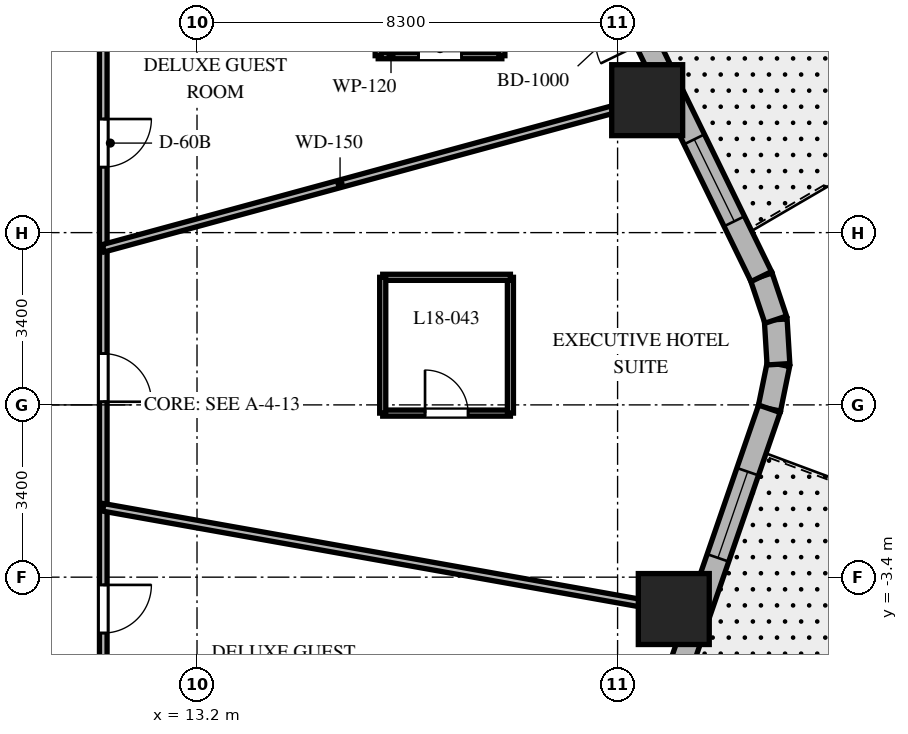
"""IFC4 building model, lengths in metres.
Left out: names, types, materials, properties, quantities, classifications, styles, units other than length and angle.
Written with IfcOpenShell. Run it as: python <this file> out.ifc"""

import sys

from ifc_helpers import new_model, si_unit, direction, frame, frame_2d, origin, origin_2d, place, context, subcontext, project, spatial, rectangle, extrude, element, fill, save


model = new_model("IFC4")
c1 = context("Model", 3, precision=1e-05, world=origin(), true_north=direction((0.0, 1.0)))
c2 = subcontext(c1, "Body", "Model", "MODEL_VIEW")
j1 = project(units=[si_unit("LENGTHUNIT", "METRE"), si_unit("PLANEANGLEUNIT", "RADIAN")], contexts=[c1])
p1 = place(None, origin())
s1 = spatial("IfcSite", under=j1, at=p1, CompositionType="ELEMENT")
p2 = place(p1, origin())
s2 = spatial("IfcBuilding", under=s1, at=p2, CompositionType="ELEMENT")
p3 = place(p2, frame((0.0, 0.0, 78.6)))
s3 = spatial("IfcBuildingStorey", under=s2, at=p3, CompositionType="ELEMENT", Elevation=78.6)
for number, where, z_axis, x_axis in (
    (1, (22.609, -4.029, 0.0), (0.0, 0.0, 1.0), (1.0, 0.0, 0.0)),
    (2, (22.084, 6.014, 0.0), (0.0, 0.0, 1.0), (1.0, 0.0, 0.0)),
):
    element("IfcColumn", number, at=place(p3, frame(where, z_axis=z_axis, x_axis=x_axis)), inside=s3, PredefinedType="COLUMN", context=c2, shape_type="SweptSolid", body=[
        extrude(rectangle(XDim=1.4, YDim=1.4, at=origin_2d()), origin(), (0.0, 0.0, 1.0), 3.7),
    ])
p4 = place(p3, frame((24.496, -0.077, 0.0), z_axis=(0.0, 0.0, 1.0), x_axis=(0.199570594521, 0.979883451132, 0.0)))
e3 = element("IfcWall", 3, at=p4, inside=s3, PredefinedType="SOLIDWALL", context=c2, shape_type="SweptSolid", body=[
    extrude(rectangle(XDim=0.897, YDim=0.45, at=frame_2d((0.448, 0.0))), origin(), (0.0, 0.0, 1.0), 3.4),
])
p5 = place(p3, frame((24.675, 0.802, 0.0), z_axis=(0.0, 0.0, 1.0), x_axis=(-0.061188874166, 0.998126205286, 0.0)))
e4 = element("IfcWall", 4, at=p5, inside=s3, PredefinedType="SOLIDWALL", context=c2, shape_type="SweptSolid", body=[
    extrude(rectangle(XDim=0.882, YDim=0.45, at=frame_2d((0.441, 0.0))), origin(), (0.0, 0.0, 1.0), 3.4),
])
p6 = place(p3, frame((24.621, 1.682, 0.0), z_axis=(0.0, 0.0, 1.0), x_axis=(-0.317697451681, 0.948192137278, 0.0)))
e5 = element("IfcWall", 5, at=p6, inside=s3, PredefinedType="SOLIDWALL", context=c2, shape_type="SweptSolid", body=[
    extrude(rectangle(XDim=0.897, YDim=0.45, at=frame_2d((0.448, 0.0))), origin(), (0.0, 0.0, 1.0), 3.4),
])
p7 = place(p3, frame((17.39, -20.678, 0.0), z_axis=(0.0, 0.0, 1.0), x_axis=(0.326068018294, 0.945346310854, 0.0)))
e6 = element("IfcWall", 6, at=p7, inside=s3, PredefinedType="SOLIDWALL", context=c2, shape_type="SweptSolid", body=[
    extrude(rectangle(XDim=21.793, YDim=0.45, at=frame_2d((10.896, 0.0))), origin(), (0.0, 0.0, 1.0), 3.4),
])
p8 = place(p7, frame((5.493, 0.0, 0.0)))
e7 = element("IfcOpeningElement", 7, at=p8, cuts=e6, PredefinedType="OPENING", context=c2, shape_type="SweptSolid", body=[
    extrude(rectangle(XDim=0.95, YDim=2.15, at=frame_2d((0.475, 1.075))), frame((0.0, 0.235, 0.0), z_axis=(0.0, -1.0, 0.0), x_axis=(1.0, 0.0, 0.0)), (0.0, 0.0, 1.0), 0.47),
])
p9 = place(p7, frame((1.26, 0.0, 0.8)))
e8 = element("IfcOpeningElement", 8, at=p9, cuts=e6, PredefinedType="OPENING", context=c2, shape_type="SweptSolid", body=[
    extrude(rectangle(XDim=1.8, YDim=1.8, at=frame_2d((0.9, 0.9))), frame((0.0, 0.235, 0.0), z_axis=(0.0, -1.0, 0.0), x_axis=(1.0, 0.0, 0.0)), (0.0, 0.0, 1.0), 0.47),
])
p10 = place(p7, frame((7.283, 0.0, 0.8)))
e9 = element("IfcOpeningElement", 9, at=p10, cuts=e6, PredefinedType="OPENING", context=c2, shape_type="SweptSolid", body=[
    extrude(rectangle(XDim=1.8, YDim=1.8, at=frame_2d((0.9, 0.9))), frame((0.0, 0.235, 0.0), z_axis=(0.0, -1.0, 0.0), x_axis=(1.0, 0.0, 0.0)), (0.0, 0.0, 1.0), 0.47),
])
p11 = place(p7, frame((12.736, 0.0, 0.8)))
e10 = element("IfcOpeningElement", 10, at=p11, cuts=e6, PredefinedType="OPENING", context=c2, shape_type="SweptSolid", body=[
    extrude(rectangle(XDim=1.8, YDim=1.8, at=frame_2d((0.9, 0.9))), frame((0.0, 0.235, 0.0), z_axis=(0.0, -1.0, 0.0), x_axis=(1.0, 0.0, 0.0)), (0.0, 0.0, 1.0), 0.47),
])
p12 = place(p7, frame((18.68, 0.0, 0.8)))
e11 = element("IfcOpeningElement", 11, at=p12, cuts=e6, PredefinedType="OPENING", context=c2, shape_type="SweptSolid", body=[
    extrude(rectangle(XDim=1.8, YDim=1.8, at=frame_2d((0.9, 0.9))), frame((0.0, 0.235, 0.0), z_axis=(0.0, -1.0, 0.0), x_axis=(1.0, 0.0, 0.0)), (0.0, 0.0, 1.0), 0.47),
])
p13 = place(p3, frame((24.336, 2.532, 0.0), z_axis=(0.0, 0.0, 1.0), x_axis=(-0.438931326393, 0.898520612291, 0.0)))
e12 = element("IfcWall", 12, at=p13, inside=s3, PredefinedType="SOLIDWALL", context=c2, shape_type="SweptSolid", body=[
    extrude(rectangle(XDim=20.623, YDim=0.45, at=frame_2d((10.312, 0.0))), origin(), (0.0, 0.0, 1.0), 3.4),
])
p14 = place(p13, frame((5.171, 0.0, 0.0)))
e13 = element("IfcOpeningElement", 13, at=p14, cuts=e12, PredefinedType="OPENING", context=c2, shape_type="SweptSolid", body=[
    extrude(rectangle(XDim=1.0, YDim=2.15, at=frame_2d((0.5, 1.075))), frame((0.0, 0.235, 0.0), z_axis=(0.0, -1.0, 0.0), x_axis=(1.0, 0.0, 0.0)), (0.0, 0.0, 1.0), 0.47),
])
p15 = place(p13, frame((6.842, 0.0, 0.8)))
e14 = element("IfcOpeningElement", 14, at=p15, cuts=e12, PredefinedType="OPENING", context=c2, shape_type="SweptSolid", body=[
    extrude(rectangle(XDim=1.8, YDim=1.8, at=frame_2d((0.9, 0.9))), frame((0.0, 0.235, 0.0), z_axis=(0.0, -1.0, 0.0), x_axis=(1.0, 0.0, 0.0)), (0.0, 0.0, 1.0), 0.47),
])
p16 = place(p13, frame((12.683, 0.0, 0.8)))
e15 = element("IfcOpeningElement", 15, at=p16, cuts=e12, PredefinedType="OPENING", context=c2, shape_type="SweptSolid", body=[
    extrude(rectangle(XDim=1.8, YDim=1.8, at=frame_2d((0.9, 0.9))), frame((0.0, 0.235, 0.0), z_axis=(0.0, -1.0, 0.0), x_axis=(1.0, 0.0, 0.0)), (0.0, 0.0, 1.0), 0.47),
])
p17 = place(p13, frame((17.66, 0.0, 0.8)))
e16 = element("IfcOpeningElement", 16, at=p17, cuts=e12, PredefinedType="OPENING", context=c2, shape_type="SweptSolid", body=[
    extrude(rectangle(XDim=1.8, YDim=1.8, at=frame_2d((0.9, 0.9))), frame((0.0, 0.235, 0.0), z_axis=(0.0, -1.0, 0.0), x_axis=(1.0, 0.0, 0.0)), (0.0, 0.0, 1.0), 0.47),
])
p18 = place(p13, frame((1.214, 0.0, 0.8)))
e17 = element("IfcOpeningElement", 17, at=p18, cuts=e12, PredefinedType="OPENING", context=c2, shape_type="SweptSolid", body=[
    extrude(rectangle(XDim=1.8, YDim=1.8, at=frame_2d((0.9, 0.9))), frame((0.0, 0.235, 0.0), z_axis=(0.0, -1.0, 0.0), x_axis=(1.0, 0.0, 0.0)), (0.0, 0.0, 1.0), 0.47),
])
p19 = place(p3, frame((11.35, 9.85, 0.0), z_axis=(0.0, 0.0, 1.0), x_axis=(0.0, -1.0, 0.0)))
e18 = element("IfcWall", 18, at=p19, inside=s3, PredefinedType="PARTITIONING", context=c2, shape_type="SweptSolid", body=[
    extrude(rectangle(XDim=19.7, YDim=0.15, at=frame_2d((9.85, 0.0))), origin(), (0.0, 0.0, 1.0), 2.84),
])
p20 = place(p19, frame((4.208, 0.0, 0.0)))
e19 = element("IfcOpeningElement", 19, at=p20, cuts=e18, PredefinedType="OPENING", context=c2, shape_type="SweptSolid", body=[
    extrude(rectangle(XDim=0.95, YDim=2.03, at=frame_2d((0.475, 1.015))), frame((0.0, 0.085, 0.0), z_axis=(0.0, -1.0, 0.0), x_axis=(1.0, 0.0, 0.0)), (0.0, 0.0, 1.0), 0.17),
])
p21 = place(p19, frame((0.97, 0.0, 0.0)))
e20 = element("IfcOpeningElement", 20, at=p21, cuts=e18, PredefinedType="OPENING", context=c2, shape_type="SweptSolid", body=[
    extrude(rectangle(XDim=0.95, YDim=2.03, at=frame_2d((0.475, 1.015))), frame((0.0, 0.085, 0.0), z_axis=(0.0, -1.0, 0.0), x_axis=(1.0, 0.0, 0.0)), (0.0, 0.0, 1.0), 0.17),
])
p22 = place(p19, frame((17.181, 0.0, 0.0)))
e21 = element("IfcOpeningElement", 21, at=p22, cuts=e18, PredefinedType="OPENING", context=c2, shape_type="SweptSolid", body=[
    extrude(rectangle(XDim=0.95, YDim=2.03, at=frame_2d((0.475, 1.015))), frame((0.0, 0.085, 0.0), z_axis=(0.0, -1.0, 0.0), x_axis=(1.0, 0.0, 0.0)), (0.0, 0.0, 1.0), 0.17),
])
p23 = place(p19, frame((13.403, 0.0, 0.0)))
e22 = element("IfcOpeningElement", 22, at=p23, cuts=e18, PredefinedType="OPENING", context=c2, shape_type="SweptSolid", body=[
    extrude(rectangle(XDim=0.95, YDim=2.03, at=frame_2d((0.475, 1.015))), frame((0.0, 0.085, 0.0), z_axis=(0.0, -1.0, 0.0), x_axis=(1.0, 0.0, 0.0)), (0.0, 0.0, 1.0), 0.17),
])
p24 = place(p19, frame((8.838, 0.0, 0.0)))
e23 = element("IfcOpeningElement", 23, at=p24, cuts=e18, PredefinedType="OPENING", context=c2, shape_type="SweptSolid", body=[
    extrude(rectangle(XDim=0.95, YDim=2.03, at=frame_2d((0.475, 1.015))), frame((0.0, 0.085, 0.0), z_axis=(0.0, -1.0, 0.0), x_axis=(1.0, 0.0, 0.0)), (0.0, 0.0, 1.0), 0.17),
])
p25 = place(p3, frame((11.35, 3.091, 0.0), z_axis=(0.0, 0.0, 1.0), x_axis=(0.964859685283, 0.262765651704, 0.0)))
e24 = element("IfcWall", 24, at=p25, inside=s3, PredefinedType="PARTITIONING", context=c2, shape_type="SweptSolid", body=[
    extrude(rectangle(XDim=11.629, YDim=0.15, at=frame_2d((5.814, 0.0))), origin(), (0.0, 0.0, 1.0), 2.54),
])
p26 = place(p3, frame((11.35, -2.023, 0.0), z_axis=(0.0, 0.0, 1.0), x_axis=(0.984493741877, -0.17541970301, 0.0)))
e25 = element("IfcWall", 25, at=p26, inside=s3, PredefinedType="PARTITIONING", context=c2, shape_type="SweptSolid", body=[
    extrude(rectangle(XDim=11.937, YDim=0.15, at=frame_2d((5.969, 0.0))), origin(), (0.0, 0.0, 1.0), 2.54),
])
p27 = place(p3, frame((16.776, 6.892, 0.0), z_axis=(0.0, 0.0, 1.0), x_axis=(1.0, 0.0, 0.0)))
e26 = element("IfcWall", 26, at=p27, inside=s3, PredefinedType="PARTITIONING", context=c2, shape_type="SweptSolid", body=[
    extrude(rectangle(XDim=2.44, YDim=0.12, at=frame_2d((1.22, 0.0))), origin(), (0.0, 0.0, 1.0), 2.927),
])
p28 = place(p27, frame((0.795, 0.0, 0.0)))
e27 = element("IfcOpeningElement", 27, at=p28, cuts=e26, PredefinedType="OPENING", context=c2, shape_type="SweptSolid", body=[
    extrude(rectangle(XDim=0.85, YDim=2.03, at=frame_2d((0.425, 1.015))), frame((0.0, 0.07, 0.0), z_axis=(0.0, -1.0, 0.0), x_axis=(1.0, 0.0, 0.0)), (0.0, 0.0, 1.0), 0.14),
])
p29 = place(p3, frame((19.216, 6.892, 0.0), z_axis=(0.0, 0.0, 1.0), x_axis=(0.0, 1.0, 0.0)))
e28 = element("IfcWall", 28, at=p29, inside=s3, PredefinedType="PARTITIONING", context=c2, shape_type="SweptSolid", body=[
    extrude(rectangle(XDim=2.61, YDim=0.12, at=frame_2d((1.305, 0.0))), origin(), (0.0, 0.0, 1.0), 3.4),
])
p30 = place(p3, frame((16.776, 9.502, 0.0), z_axis=(0.0, 0.0, 1.0), x_axis=(0.0, -1.0, 0.0)))
e29 = element("IfcWall", 29, at=p30, inside=s3, PredefinedType="PARTITIONING", context=c2, shape_type="SweptSolid", body=[
    extrude(rectangle(XDim=2.61, YDim=0.12, at=frame_2d((1.305, 0.0))), origin(), (0.0, 0.0, 1.0), 2.927),
])
p31 = place(p3, frame((16.865, -0.162, 0.0), z_axis=(0.0, 0.0, 1.0), x_axis=(1.0, 0.0, 0.0)))
e30 = element("IfcWall", 30, at=p31, inside=s3, PredefinedType="PARTITIONING", context=c2, shape_type="SweptSolid", body=[
    extrude(rectangle(XDim=2.52, YDim=0.12, at=frame_2d((1.26, 0.0))), origin(), (0.0, 0.0, 1.0), 2.84),
])
p32 = place(p31, frame((0.835, 0.0, 0.0)))
e31 = element("IfcOpeningElement", 31, at=p32, cuts=e30, PredefinedType="OPENING", context=c2, shape_type="SweptSolid", body=[
    extrude(rectangle(XDim=0.85, YDim=2.03, at=frame_2d((0.425, 1.015))), frame((0.0, 0.07, 0.0), z_axis=(0.0, -1.0, 0.0), x_axis=(1.0, 0.0, 0.0)), (0.0, 0.0, 1.0), 0.14),
])
p33 = place(p3, frame((19.385, -0.162, 0.0), z_axis=(0.0, 0.0, 1.0), x_axis=(0.0, 1.0, 0.0)))
e32 = element("IfcWall", 32, at=p33, inside=s3, PredefinedType="PARTITIONING", context=c2, shape_type="SweptSolid", body=[
    extrude(rectangle(XDim=2.68, YDim=0.12, at=frame_2d((1.34, 0.0))), origin(), (0.0, 0.0, 1.0), 3.4),
])
p34 = place(p3, frame((19.385, 2.518, 0.0), z_axis=(0.0, 0.0, 1.0), x_axis=(-1.0, 0.0, 0.0)))
e33 = element("IfcWall", 33, at=p34, inside=s3, PredefinedType="PARTITIONING", context=c2, shape_type="SweptSolid", body=[
    extrude(rectangle(XDim=2.52, YDim=0.12, at=frame_2d((1.26, 0.0))), origin(), (0.0, 0.0, 1.0), 2.84),
])
p35 = place(p3, frame((16.865, 2.518, 0.0), z_axis=(0.0, 0.0, 1.0), x_axis=(0.0, -1.0, 0.0)))
e34 = element("IfcWall", 34, at=p35, inside=s3, PredefinedType="PARTITIONING", context=c2, shape_type="SweptSolid", body=[
    extrude(rectangle(XDim=2.68, YDim=0.12, at=frame_2d((1.34, 0.0))), origin(), (0.0, 0.0, 1.0), 3.4),
])
p36 = place(p12, origin())
e35 = element("IfcWindow", 35, at=p36, inside=s3, PartitioningType="SINGLE_PANEL", PredefinedType="WINDOW", context=c2, shape_type="SweptSolid", body=[
    extrude(rectangle(XDim=1.8, YDim=1.8, at=frame_2d((0.9, 0.9))), frame((0.0, 0.03, 0.0), z_axis=(0.0, -1.0, 0.0), x_axis=(1.0, 0.0, 0.0)), (0.0, 0.0, 1.0), 0.06),
])
fill(e11, e35)
p37 = place(p18, origin())
e36 = element("IfcWindow", 36, at=p37, inside=s3, PartitioningType="SINGLE_PANEL", PredefinedType="WINDOW", context=c2, shape_type="SweptSolid", body=[
    extrude(rectangle(XDim=1.8, YDim=1.8, at=frame_2d((0.9, 0.9))), frame((0.0, 0.03, 0.0), z_axis=(0.0, -1.0, 0.0), x_axis=(1.0, 0.0, 0.0)), (0.0, 0.0, 1.0), 0.06),
])
fill(e17, e36)
p38 = place(p20, origin())
e37 = element("IfcDoor", 37, at=p38, inside=s3, OperationType="SINGLE_SWING_LEFT", PredefinedType="DOOR", context=c2, shape_type="SweptSolid", body=[
    extrude(rectangle(XDim=0.95, YDim=2.03, at=frame_2d((0.475, 1.015))), frame((0.0, 0.025, 0.0), z_axis=(0.0, -1.0, 0.0), x_axis=(1.0, 0.0, 0.0)), (0.0, 0.0, 1.0), 0.05),
])
fill(e19, e37)
p39 = place(p28, origin())
e38 = element("IfcDoor", 38, at=p39, inside=s3, OperationType="SINGLE_SWING_RIGHT", PredefinedType="DOOR", context=c2, shape_type="SweptSolid", body=[
    extrude(rectangle(XDim=0.85, YDim=2.03, at=frame_2d((0.425, 1.015))), frame((0.0, 0.025, 0.0), z_axis=(0.0, -1.0, 0.0), x_axis=(1.0, 0.0, 0.0)), (0.0, 0.0, 1.0), 0.05),
])
fill(e27, e38)
p40 = place(p23, origin())
e39 = element("IfcDoor", 39, at=p40, inside=s3, OperationType="SINGLE_SWING_LEFT", PredefinedType="DOOR", context=c2, shape_type="SweptSolid", body=[
    extrude(rectangle(XDim=0.95, YDim=2.03, at=frame_2d((0.475, 1.015))), frame((0.0, 0.025, 0.0), z_axis=(0.0, -1.0, 0.0), x_axis=(1.0, 0.0, 0.0)), (0.0, 0.0, 1.0), 0.05),
])
fill(e22, e39)
p41 = place(p24, origin())
e40 = element("IfcDoor", 40, at=p41, inside=s3, OperationType="SINGLE_SWING_RIGHT", PredefinedType="DOOR", context=c2, shape_type="SweptSolid", body=[
    extrude(rectangle(XDim=0.95, YDim=2.03, at=frame_2d((0.475, 1.015))), frame((0.0, 0.025, 0.0), z_axis=(0.0, -1.0, 0.0), x_axis=(1.0, 0.0, 0.0)), (0.0, 0.0, 1.0), 0.05),
])
fill(e23, e40)
p42 = place(p32, origin())
e41 = element("IfcDoor", 41, at=p42, inside=s3, OperationType="SINGLE_SWING_LEFT", PredefinedType="DOOR", context=c2, shape_type="SweptSolid", body=[
    extrude(rectangle(XDim=0.85, YDim=2.03, at=frame_2d((0.425, 1.015))), frame((0.0, 0.025, 0.0), z_axis=(0.0, -1.0, 0.0), x_axis=(1.0, 0.0, 0.0)), (0.0, 0.0, 1.0), 0.05),
])
fill(e31, e41)
save(model, sys.argv[1])
